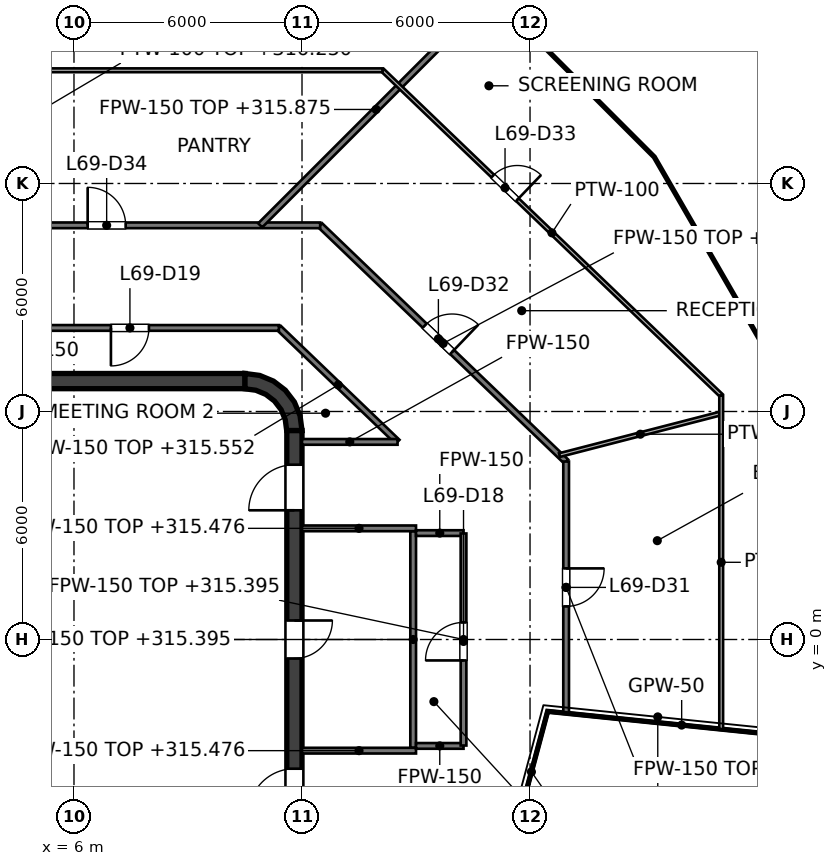
"""IFC4 building model, lengths in metres.
Left out: names, types, materials, properties, quantities, classifications, styles, units other than length and angle.
Written with IfcOpenShell. Run it as: python <this file> out.ifc"""

import sys

from ifc_helpers import new_model, si_unit, direction, frame, frame_2d, origin, place, context, subcontext, project, spatial, polyline, rectangle, outline, extrude, element, fill, save


model = new_model("IFC4")
c1 = context("Model", 3, precision=1e-05, world=origin(), true_north=direction((0.0, 1.0)))
c2 = subcontext(c1, "Body", "Model", "MODEL_VIEW")
j1 = project(units=[si_unit("LENGTHUNIT", "METRE"), si_unit("PLANEANGLEUNIT", "RADIAN")], contexts=[c1])
p1 = place(None, origin())
s1 = spatial("IfcSite", under=j1, at=p1, CompositionType="ELEMENT")
p2 = place(p1, origin())
s2 = spatial("IfcBuilding", under=s1, at=p2, CompositionType="ELEMENT")
p3 = place(p2, frame((0.0, 0.0, 312.4)))
s3 = spatial("IfcBuildingStorey", under=s2, at=p3, CompositionType="ELEMENT", Elevation=312.4)
p4 = place(p3, frame((-10.5, 6.8, 0.0), z_axis=(0.0, 0.0, 1.0), x_axis=(1.0, 0.0, 0.0)))
e1 = element("IfcWall", 1, at=p4, inside=s3, PredefinedType="SHEAR", context=c2, shape_type="SweptSolid", body=[
    extrude(rectangle(XDim=21.0, YDim=0.4, at=frame_2d((10.5, 0.0))), origin(), (0.0, 0.0, 1.0), 4.0),
])
p5 = place(p3, frame((11.8, -5.5, 0.0), z_axis=(0.0, 0.0, 1.0), x_axis=(0.0, 1.0, 0.0)))
e2 = element("IfcWall", 2, at=p5, inside=s3, PredefinedType="SHEAR", context=c2, shape_type="SweptSolid", body=[
    extrude(rectangle(XDim=11.0, YDim=0.4, at=frame_2d((5.5, 0.0))), origin(), (0.0, 0.0, 1.0), 4.0),
])
p6 = place(p5, frame((5.0, 0.0, 0.0)))
e3 = element("IfcOpeningElement", 3, at=p6, cuts=e2, PredefinedType="OPENING", context=c2, shape_type="SweptSolid", body=[
    extrude(rectangle(XDim=1.0, YDim=2.1, at=frame_2d((0.5, 1.05))), frame((0.0, 0.2, 0.0), z_axis=(0.0, -1.0, 0.0), x_axis=(1.0, 0.0, 0.0)), (0.0, 0.0, 1.0), 0.4),
])
p7 = place(p5, frame((0.9, 0.0, 0.0)))
e4 = element("IfcOpeningElement", 4, at=p7, cuts=e2, PredefinedType="OPENING", context=c2, shape_type="SweptSolid", body=[
    extrude(rectangle(XDim=1.2, YDim=2.1, at=frame_2d((0.6, 1.05))), frame((0.0, 0.2, 0.0), z_axis=(0.0, -1.0, 0.0), x_axis=(1.0, 0.0, 0.0)), (0.0, 0.0, 1.0), 0.4),
])
p8 = place(p5, frame((8.9, 0.0, 0.0)))
e5 = element("IfcOpeningElement", 5, at=p8, cuts=e2, PredefinedType="OPENING", context=c2, shape_type="SweptSolid", body=[
    extrude(rectangle(XDim=1.2, YDim=2.1, at=frame_2d((0.6, 1.05))), frame((0.0, 0.2, 0.0), z_axis=(0.0, -1.0, 0.0), x_axis=(1.0, 0.0, 0.0)), (0.0, 0.0, 1.0), 0.4),
])
p9 = place(p3, origin())
e6 = element("IfcWall", 6, at=p9, inside=s3, PredefinedType="SHEAR", context=c2, shape_type="SweptSolid", body=[
    extrude(outline(polyline([(10.5, 7.0), (10.5, 6.596), (10.784, 6.559), (11.048, 6.45), (11.275, 6.275), (11.45, 6.048), (11.559, 5.784), (11.596, 5.5), (12.0, 5.5), (11.949, 5.888), (11.799, 6.25), (11.561, 6.561), (11.25, 6.799), (10.888, 6.949), (10.5, 7.0)])), origin(), (0.0, 0.0, 1.0), 4.0),
])
p10 = place(p3, frame((9.0, 4.1, 0.0), z_axis=(0.0, 0.0, 1.0), x_axis=(0.0, 1.0, 0.0)))
e7 = element("IfcWall", 7, at=p10, inside=s3, PredefinedType="SOLIDWALL", context=c2, shape_type="SweptSolid", body=[
    extrude(rectangle(XDim=2.5, YDim=0.25, at=frame_2d((1.25, 0.0))), origin(), (0.0, 0.0, 1.0), 3.85),
])
p11 = place(p10, frame((0.65, 0.0, 0.0)))
e8 = element("IfcOpeningElement", 8, at=p11, cuts=e7, PredefinedType="OPENING", context=c2, shape_type="SweptSolid", body=[
    extrude(rectangle(XDim=1.2, YDim=2.1, at=frame_2d((0.6, 1.05))), frame((0.0, 0.125, 0.0), z_axis=(0.0, -1.0, 0.0), x_axis=(1.0, 0.0, 0.0)), (0.0, 0.0, 1.0), 0.25),
])
p12 = place(p3, frame((0.775, 1.525, 0.0), z_axis=(0.0, 0.0, 1.0), x_axis=(1.0, 0.0, 0.0)))
e9 = element("IfcWall", 9, at=p12, inside=s3, PredefinedType="SOLIDWALL", context=c2, shape_type="SweptSolid", body=[
    extrude(rectangle(XDim=8.35, YDim=0.25, at=frame_2d((4.175, 0.0))), origin(), (0.0, 0.0, 1.0), 3.85),
])
p13 = place(p12, frame((0.925, 0.0, 0.0)))
e10 = element("IfcOpeningElement", 10, at=p13, cuts=e9, PredefinedType="OPENING", context=c2, shape_type="SweptSolid", body=[
    extrude(rectangle(XDim=1.1, YDim=2.1, at=frame_2d((0.55, 1.05))), frame((0.0, 0.125, 0.0), z_axis=(0.0, -1.0, 0.0), x_axis=(1.0, 0.0, 0.0)), (0.0, 0.0, 1.0), 0.25),
])
p14 = place(p12, frame((3.625, 0.0, 0.0)))
e11 = element("IfcOpeningElement", 11, at=p14, cuts=e9, PredefinedType="OPENING", context=c2, shape_type="SweptSolid", body=[
    extrude(rectangle(XDim=1.1, YDim=2.1, at=frame_2d((0.55, 1.05))), frame((0.0, 0.125, 0.0), z_axis=(0.0, -1.0, 0.0), x_axis=(1.0, 0.0, 0.0)), (0.0, 0.0, 1.0), 0.25),
])
p15 = place(p12, frame((6.325, 0.0, 0.0)))
e12 = element("IfcOpeningElement", 12, at=p15, cuts=e9, PredefinedType="OPENING", context=c2, shape_type="SweptSolid", body=[
    extrude(rectangle(XDim=1.1, YDim=2.1, at=frame_2d((0.55, 1.05))), frame((0.0, 0.125, 0.0), z_axis=(0.0, -1.0, 0.0), x_axis=(1.0, 0.0, 0.0)), (0.0, 0.0, 1.0), 0.25),
])
p16 = place(p3, frame((0.775, 3.975, 0.0), z_axis=(0.0, 0.0, 1.0), x_axis=(1.0, 0.0, 0.0)))
e13 = element("IfcWall", 13, at=p16, inside=s3, PredefinedType="SOLIDWALL", context=c2, shape_type="SweptSolid", body=[
    extrude(rectangle(XDim=8.35, YDim=0.25, at=frame_2d((4.175, 0.0))), origin(), (0.0, 0.0, 1.0), 3.85),
])
for number, where, z_axis, x_axis in (
    (14, (9.0, 1.65, 0.0), (0.0, 0.0, 1.0), (0.0, 1.0, 0.0)),
    (15, (6.3, 1.65, 0.0), (0.0, 0.0, 1.0), (0.0, 1.0, 0.0)),
):
    element("IfcWall", number, at=place(p3, frame(where, z_axis=z_axis, x_axis=x_axis)), inside=s3, PredefinedType="SOLIDWALL", context=c2, shape_type="SweptSolid", body=[
        extrude(rectangle(XDim=2.2, YDim=0.25, at=frame_2d((1.1, 0.0))), origin(), (0.0, 0.0, 1.0), 3.85),
    ])
p17 = place(p3, frame((-9.125, -1.525, 0.0), z_axis=(0.0, 0.0, 1.0), x_axis=(1.0, 0.0, 0.0)))
e16 = element("IfcWall", 16, at=p17, inside=s3, PredefinedType="SOLIDWALL", context=c2, shape_type="SweptSolid", body=[
    extrude(rectangle(XDim=18.25, YDim=0.25, at=frame_2d((9.125, 0.0))), origin(), (0.0, 0.0, 1.0), 3.85),
])
p18 = place(p17, frame((7.15, 0.0, 0.0)))
e17 = element("IfcOpeningElement", 17, at=p18, cuts=e16, PredefinedType="OPENING", context=c2, shape_type="SweptSolid", body=[
    extrude(rectangle(XDim=1.2, YDim=2.1, at=frame_2d((0.6, 1.05))), frame((0.0, 0.125, 0.0), z_axis=(0.0, -1.0, 0.0), x_axis=(1.0, 0.0, 0.0)), (0.0, 0.0, 1.0), 0.25),
])
p19 = place(p17, frame((10.2, 0.0, 0.0)))
e18 = element("IfcOpeningElement", 18, at=p19, cuts=e16, PredefinedType="OPENING", context=c2, shape_type="SweptSolid", body=[
    extrude(rectangle(XDim=1.2, YDim=2.1, at=frame_2d((0.6, 1.05))), frame((0.0, 0.125, 0.0), z_axis=(0.0, -1.0, 0.0), x_axis=(1.0, 0.0, 0.0)), (0.0, 0.0, 1.0), 0.25),
])
p20 = place(p17, frame((16.075, 0.0, 0.0)))
e19 = element("IfcOpeningElement", 19, at=p20, cuts=e16, PredefinedType="OPENING", context=c2, shape_type="SweptSolid", body=[
    extrude(rectangle(XDim=1.0, YDim=2.1, at=frame_2d((0.5, 1.05))), frame((0.0, 0.125, 0.0), z_axis=(0.0, -1.0, 0.0), x_axis=(1.0, 0.0, 0.0)), (0.0, 0.0, 1.0), 0.25),
])
for number, where, z_axis, x_axis in (
    (20, (5.9, -3.85, 0.0), (0.0, 0.0, 1.0), (0.0, 1.0, 0.0)),
    (21, (9.0, -3.85, 0.0), (0.0, 0.0, 1.0), (0.0, 1.0, 0.0)),
):
    element("IfcWall", number, at=place(p3, frame(where, z_axis=z_axis, x_axis=x_axis)), inside=s3, PredefinedType="SOLIDWALL", context=c2, shape_type="SweptSolid", body=[
        extrude(rectangle(XDim=2.2, YDim=0.25, at=frame_2d((1.1, 0.0))), origin(), (0.0, 0.0, 1.0), 3.85),
    ])
p21 = place(p3, frame((14.925, -2.85, 0.0), z_axis=(0.0, 0.0, 1.0), x_axis=(0.0, 1.0, 0.0)))
e22 = element("IfcWall", 22, at=p21, inside=s3, PredefinedType="PARTITIONING", context=c2, shape_type="SweptSolid", body=[
    extrude(rectangle(XDim=5.7, YDim=0.15, at=frame_2d((2.85, 0.0))), origin(), (0.0, 0.0, 1.0), 2.995),
])
for number, where, z_axis, x_axis in (
    (23, (12.0, 2.925, 0.0), (0.0, 0.0, 1.0), (1.0, 0.0, 0.0)),
    (24, (12.0, -2.925, 0.0), (0.0, 0.0, 1.0), (1.0, 0.0, 0.0)),
):
    element("IfcWall", number, at=place(p3, frame(where, z_axis=z_axis, x_axis=x_axis)), inside=s3, PredefinedType="PARTITIONING", context=c2, shape_type="SweptSolid", body=[
        extrude(rectangle(XDim=3.0, YDim=0.15, at=frame_2d((1.5, 0.0))), origin(), (0.0, 0.0, 1.0), 3.076),
    ])
p22 = place(p3, frame((11.391, 8.199, 0.0), z_axis=(0.0, 0.0, 1.0), x_axis=(0.721311820102, -0.69261046641, 0.0)))
e25 = element("IfcWall", 25, at=p22, inside=s3, PredefinedType="PARTITIONING", context=c2, shape_type="SweptSolid", body=[
    extrude(rectangle(XDim=4.33, YDim=0.15, at=frame_2d((2.165, 0.0))), origin(), (0.0, 0.0, 1.0), 3.152),
])
p23 = place(p3, frame((12.478, 10.899, 0.0), z_axis=(0.0, 0.0, 1.0), x_axis=(0.721299239471, -0.692623568137, 0.0)))
e26 = element("IfcWall", 26, at=p23, inside=s3, PredefinedType="PARTITIONING", context=c2, shape_type="SweptSolid", body=[
    extrude(rectangle(XDim=8.974, YDim=0.15, at=frame_2d((4.487, 0.0))), origin(), (0.0, 0.0, 1.0), 3.076),
])
p24 = place(p23, frame((3.813, 0.0, 0.0)))
e27 = element("IfcOpeningElement", 27, at=p24, cuts=e26, PredefinedType="OPENING", context=c2, shape_type="SweptSolid", body=[
    extrude(rectangle(XDim=1.0, YDim=2.1, at=frame_2d((0.5, 1.05))), frame((0.0, 0.075, 0.0), z_axis=(0.0, -1.0, 0.0), x_axis=(1.0, 0.0, 0.0)), (0.0, 0.0, 1.0), 0.15),
])
for number, where, z_axis, x_axis in (
    (28, (15.0, -2.8, 0.0), (0.0, 0.0, 1.0), (1.0, 0.0, 0.0)),
    (29, (15.0, 2.8, 0.0), (0.0, 0.0, 1.0), (1.0, 0.0, 0.0)),
):
    element("IfcWall", number, at=place(p3, frame(where, z_axis=z_axis, x_axis=x_axis)), inside=s3, PredefinedType="PARTITIONING", context=c2, shape_type="SweptSolid", body=[
        extrude(rectangle(XDim=1.25, YDim=0.15, at=frame_2d((0.625, 0.0))), origin(), (0.0, 0.0, 1.0), 3.85),
    ])
p25 = place(p3, frame((12.0, 5.2, 0.0), z_axis=(0.0, 0.0, 1.0), x_axis=(1.0, 0.0, 0.0)))
e30 = element("IfcWall", 30, at=p25, inside=s3, PredefinedType="PARTITIONING", context=c2, shape_type="SweptSolid", body=[
    extrude(rectangle(XDim=2.514, YDim=0.15, at=frame_2d((1.257, 0.0))), origin(), (0.0, 0.0, 1.0), 3.85),
])
p26 = place(p3, frame((-11.391, 8.199, 0.0), z_axis=(0.0, 0.0, 1.0), x_axis=(1.0, 0.0, 0.0)))
e31 = element("IfcWall", 31, at=p26, inside=s3, PredefinedType="PARTITIONING", context=c2, shape_type="SweptSolid", body=[
    extrude(rectangle(XDim=22.782, YDim=0.15, at=frame_2d((11.391, 0.0))), origin(), (0.0, 0.0, 1.0), 2.927),
])
p27 = place(p26, frame((18.363, 0.0, 0.0)))
e32 = element("IfcOpeningElement", 32, at=p27, cuts=e31, PredefinedType="OPENING", context=c2, shape_type="SweptSolid", body=[
    extrude(rectangle(XDim=1.0, YDim=2.1, at=frame_2d((0.5, 1.05))), frame((0.0, 0.075, 0.0), z_axis=(0.0, -1.0, 0.0), x_axis=(1.0, 0.0, 0.0)), (0.0, 0.0, 1.0), 0.15),
])
p28 = place(p26, frame((10.841, 0.0, 0.0)))
e33 = element("IfcOpeningElement", 33, at=p28, cuts=e31, PredefinedType="OPENING", context=c2, shape_type="SweptSolid", body=[
    extrude(rectangle(XDim=1.0, YDim=2.1, at=frame_2d((0.5, 1.05))), frame((0.0, 0.075, 0.0), z_axis=(0.0, -1.0, 0.0), x_axis=(1.0, 0.0, 0.0)), (0.0, 0.0, 1.0), 0.15),
])
p29 = place(p26, frame((3.419, 0.0, 0.0)))
e34 = element("IfcOpeningElement", 34, at=p29, cuts=e31, PredefinedType="OPENING", context=c2, shape_type="SweptSolid", body=[
    extrude(rectangle(XDim=1.0, YDim=2.1, at=frame_2d((0.5, 1.05))), frame((0.0, 0.075, 0.0), z_axis=(0.0, -1.0, 0.0), x_axis=(1.0, 0.0, 0.0)), (0.0, 0.0, 1.0), 0.15),
])
p30 = place(p3, frame((-12.478, 10.899, 0.0), z_axis=(0.0, 0.0, 1.0), x_axis=(1.0, 0.0, 0.0)))
e35 = element("IfcWall", 35, at=p30, inside=s3, PredefinedType="PARTITIONING", context=c2, shape_type="SweptSolid", body=[
    extrude(rectangle(XDim=24.956, YDim=0.15, at=frame_2d((12.478, 0.0))), origin(), (0.0, 0.0, 1.0), 2.927),
])
p31 = place(p30, frame((18.838, 0.0, 0.0)))
e36 = element("IfcOpeningElement", 36, at=p31, cuts=e35, PredefinedType="OPENING", context=c2, shape_type="SweptSolid", body=[
    extrude(rectangle(XDim=1.0, YDim=2.1, at=frame_2d((0.5, 1.05))), frame((0.0, 0.075, 0.0), z_axis=(0.0, -1.0, 0.0), x_axis=(1.0, 0.0, 0.0)), (0.0, 0.0, 1.0), 0.15),
])
p32 = place(p30, frame((10.292, 0.0, 0.0)))
e37 = element("IfcOpeningElement", 37, at=p32, cuts=e35, PredefinedType="OPENING", context=c2, shape_type="SweptSolid", body=[
    extrude(rectangle(XDim=1.0, YDim=2.1, at=frame_2d((0.5, 1.05))), frame((0.0, 0.075, 0.0), z_axis=(0.0, -1.0, 0.0), x_axis=(1.0, 0.0, 0.0)), (0.0, 0.0, 1.0), 0.15),
])
p33 = place(p3, frame((10.9, 10.899, 0.0), z_axis=(0.0, 0.0, 1.0), x_axis=(0.707106781187, 0.707106781187, 0.0)))
e38 = element("IfcWall", 38, at=p33, inside=s3, PredefinedType="PARTITIONING", context=c2, shape_type="SweptSolid", body=[
    extrude(rectangle(XDim=8.624, YDim=0.15, at=frame_2d((4.312, 0.0))), origin(), (0.0, 0.0, 1.0), 3.475),
])
p34 = place(p3, frame((18.95, -1.941, 0.0), z_axis=(0.0, 0.0, 1.0), x_axis=(0.0, 1.0, 0.0)))
e39 = element("IfcWall", 39, at=p34, inside=s3, PredefinedType="PARTITIONING", context=c2, shape_type="SweptSolid", body=[
    extrude(rectangle(XDim=6.624, YDim=0.15, at=frame_2d((3.312, 0.0))), origin(), (0.0, 0.0, 1.0), 2.995),
])
p35 = place(p34, frame((2.812, 0.0, 0.0)))
e40 = element("IfcOpeningElement", 40, at=p35, cuts=e39, PredefinedType="OPENING", context=c2, shape_type="SweptSolid", body=[
    extrude(rectangle(XDim=1.0, YDim=2.1, at=frame_2d((0.5, 1.05))), frame((0.0, 0.075, 0.0), z_axis=(0.0, -1.0, 0.0), x_axis=(1.0, 0.0, 0.0)), (0.0, 0.0, 1.0), 0.15),
])
p36 = place(p3, frame((16.25, -2.79, 0.0), z_axis=(0.0, 0.0, 1.0), x_axis=(0.0, 1.0, 0.0)))
e41 = element("IfcWall", 41, at=p36, inside=s3, PredefinedType="PARTITIONING", context=c2, shape_type="SweptSolid", body=[
    extrude(rectangle(XDim=5.58, YDim=0.15, at=frame_2d((2.79, 0.0))), origin(), (0.0, 0.0, 1.0), 2.995),
])
p37 = place(p36, frame((2.239, 0.0, 0.0)))
e42 = element("IfcOpeningElement", 42, at=p37, cuts=e41, PredefinedType="OPENING", context=c2, shape_type="SweptSolid", body=[
    extrude(rectangle(XDim=1.0, YDim=2.1, at=frame_2d((0.5, 1.05))), frame((0.0, 0.075, 0.0), z_axis=(0.0, -1.0, 0.0), x_axis=(1.0, 0.0, 0.0)), (0.0, 0.0, 1.0), 0.15),
])
p38 = place(p3, frame((18.463, -1.891, 0.0), z_axis=(0.0, 0.0, 1.0), x_axis=(0.994796749693, -0.101879471925, 0.0)))
e43 = element("IfcWall", 43, at=p38, inside=s3, PredefinedType="PARTITIONING", context=c2, shape_type="SweptSolid", body=[
    extrude(rectangle(XDim=7.091, YDim=0.05, at=frame_2d((3.545, 0.0))), origin(), (0.0, 0.0, 1.0), 3.076),
])
p39 = place(p3, frame((17.61, -5.075, 0.0), z_axis=(0.0, 0.0, 1.0), x_axis=(0.258727446254, 0.965950365472, 0.0)))
e44 = element("IfcWall", 44, at=p39, inside=s3, PredefinedType="PARTITIONING", context=c2, shape_type="SweptSolid", body=[
    extrude(rectangle(XDim=3.296, YDim=0.05, at=frame_2d((1.648, 0.0))), origin(), (0.0, 0.0, 1.0), 3.076),
])
p40 = place(p3, frame((14.12, 14.979, 0.0), z_axis=(0.0, 0.0, 1.0), x_axis=(0.721327687229, -0.69259394138, 0.0)))
e45 = element("IfcWall", 45, at=p40, inside=s3, PredefinedType="PARTITIONING", context=c2, shape_type="SweptSolid", body=[
    extrude(rectangle(XDim=12.354, YDim=0.1, at=frame_2d((6.177, 0.0))), origin(), (0.0, 0.0, 1.0), 2.995),
])
p41 = place(p40, frame((4.017, 0.0, 0.0)))
e46 = element("IfcOpeningElement", 46, at=p41, cuts=e45, PredefinedType="OPENING", context=c2, shape_type="SweptSolid", body=[
    extrude(rectangle(XDim=0.9, YDim=2.1, at=frame_2d((0.45, 1.05))), frame((0.0, 0.05, 0.0), z_axis=(0.0, -1.0, 0.0), x_axis=(1.0, 0.0, 0.0)), (0.0, 0.0, 1.0), 0.1),
])
p42 = place(p3, frame((-14.12, 14.979, 0.0), z_axis=(0.0, 0.0, 1.0), x_axis=(1.0, 0.0, 0.0)))
e47 = element("IfcWall", 47, at=p42, inside=s3, PredefinedType="PARTITIONING", context=c2, shape_type="SweptSolid", body=[
    extrude(rectangle(XDim=28.24, YDim=0.1, at=frame_2d((14.12, 0.0))), origin(), (0.0, 0.0, 1.0), 2.927),
])
p43 = place(p42, frame((10.903, 0.0, 0.0)))
e48 = element("IfcOpeningElement", 48, at=p43, cuts=e47, PredefinedType="OPENING", context=c2, shape_type="SweptSolid", body=[
    extrude(rectangle(XDim=1.8, YDim=2.1, at=frame_2d((0.9, 1.05))), frame((0.0, 0.05, 0.0), z_axis=(0.0, -1.0, 0.0), x_axis=(1.0, 0.0, 0.0)), (0.0, 0.0, 1.0), 0.1),
])
p44 = place(p3, frame((18.774, 4.852, 0.0), z_axis=(0.0, 0.0, 1.0), x_axis=(0.968194478258, 0.250198825478, 0.0)))
e49 = element("IfcWall", 49, at=p44, inside=s3, PredefinedType="PARTITIONING", context=c2, shape_type="SweptSolid", body=[
    extrude(rectangle(XDim=4.396, YDim=0.1, at=frame_2d((2.198, 0.0))), origin(), (0.0, 0.0, 1.0), 3.85),
])
p45 = place(p3, frame((23.03, -2.358, 0.0), z_axis=(0.0, 0.0, 1.0), x_axis=(0.0, 1.0, 0.0)))
e50 = element("IfcWall", 50, at=p45, inside=s3, PredefinedType="PARTITIONING", context=c2, shape_type="SweptSolid", body=[
    extrude(rectangle(XDim=8.779, YDim=0.1, at=frame_2d((4.389, 0.0))), origin(), (0.0, 0.0, 1.0), 2.995),
])
p46 = place(p14, origin())
e51 = element("IfcDoor", 51, at=p46, inside=s3, OperationType="DOUBLE_DOOR_SLIDING", PredefinedType="DOOR", context=c2, shape_type="SweptSolid", body=[
    extrude(rectangle(XDim=1.1, YDim=2.1, at=frame_2d((0.55, 1.05))), frame((0.0, 0.025, 0.0), z_axis=(0.0, -1.0, 0.0), x_axis=(1.0, 0.0, 0.0)), (0.0, 0.0, 1.0), 0.05),
])
fill(e11, e51)
p47 = place(p15, origin())
e52 = element("IfcDoor", 52, at=p47, inside=s3, OperationType="DOUBLE_DOOR_SLIDING", PredefinedType="DOOR", context=c2, shape_type="SweptSolid", body=[
    extrude(rectangle(XDim=1.1, YDim=2.1, at=frame_2d((0.55, 1.05))), frame((0.0, 0.025, 0.0), z_axis=(0.0, -1.0, 0.0), x_axis=(1.0, 0.0, 0.0)), (0.0, 0.0, 1.0), 0.05),
])
fill(e12, e52)
p48 = place(p11, origin())
e53 = element("IfcDoor", 53, at=p48, inside=s3, OperationType="SINGLE_SWING_LEFT", PredefinedType="DOOR", context=c2, shape_type="SweptSolid", body=[
    extrude(rectangle(XDim=1.2, YDim=2.1, at=frame_2d((0.6, 1.05))), frame((0.0, 0.025, 0.0), z_axis=(0.0, -1.0, 0.0), x_axis=(1.0, 0.0, 0.0)), (0.0, 0.0, 1.0), 0.05),
])
fill(e8, e53)
p49 = place(p20, origin())
e54 = element("IfcDoor", 54, at=p49, inside=s3, OperationType="SINGLE_SWING_RIGHT", PredefinedType="DOOR", context=c2, shape_type="SweptSolid", body=[
    extrude(rectangle(XDim=1.0, YDim=2.1, at=frame_2d((0.5, 1.05))), frame((0.0, 0.025, 0.0), z_axis=(0.0, -1.0, 0.0), x_axis=(1.0, 0.0, 0.0)), (0.0, 0.0, 1.0), 0.05),
])
fill(e19, e54)
p50 = place(p6, origin())
e55 = element("IfcDoor", 55, at=p50, inside=s3, OperationType="SINGLE_SWING_RIGHT", PredefinedType="DOOR", context=c2, shape_type="SweptSolid", body=[
    extrude(rectangle(XDim=1.0, YDim=2.1, at=frame_2d((0.5, 1.05))), frame((0.0, 0.025, 0.0), z_axis=(0.0, -1.0, 0.0), x_axis=(1.0, 0.0, 0.0)), (0.0, 0.0, 1.0), 0.05),
])
fill(e3, e55)
p51 = place(p7, origin())
e56 = element("IfcDoor", 56, at=p51, inside=s3, OperationType="SINGLE_SWING_LEFT", PredefinedType="DOOR", context=c2, shape_type="SweptSolid", body=[
    extrude(rectangle(XDim=1.2, YDim=2.1, at=frame_2d((0.6, 1.05))), frame((0.0, 0.025, 0.0), z_axis=(0.0, -1.0, 0.0), x_axis=(1.0, 0.0, 0.0)), (0.0, 0.0, 1.0), 0.05),
])
fill(e4, e56)
p52 = place(p8, origin())
e57 = element("IfcDoor", 57, at=p52, inside=s3, OperationType="SINGLE_SWING_LEFT", PredefinedType="DOOR", context=c2, shape_type="SweptSolid", body=[
    extrude(rectangle(XDim=1.2, YDim=2.1, at=frame_2d((0.6, 1.05))), frame((0.0, 0.025, 0.0), z_axis=(0.0, -1.0, 0.0), x_axis=(1.0, 0.0, 0.0)), (0.0, 0.0, 1.0), 0.05),
])
fill(e5, e57)
p53 = place(p37, origin())
e58 = element("IfcDoor", 58, at=p53, inside=s3, OperationType="SINGLE_SWING_LEFT", PredefinedType="DOOR", context=c2, shape_type="SweptSolid", body=[
    extrude(rectangle(XDim=1.0, YDim=2.1, at=frame_2d((0.5, 1.05))), frame((0.0, 0.025, 0.0), z_axis=(0.0, -1.0, 0.0), x_axis=(1.0, 0.0, 0.0)), (0.0, 0.0, 1.0), 0.05),
])
fill(e42, e58)
p54 = place(p27, origin())
e59 = element("IfcDoor", 59, at=p54, inside=s3, OperationType="SINGLE_SWING_LEFT", PredefinedType="DOOR", context=c2, shape_type="SweptSolid", body=[
    extrude(rectangle(XDim=1.0, YDim=2.1, at=frame_2d((0.5, 1.05))), frame((0.0, 0.025, 0.0), z_axis=(0.0, -1.0, 0.0), x_axis=(1.0, 0.0, 0.0)), (0.0, 0.0, 1.0), 0.05),
])
fill(e32, e59)
p55 = place(p35, origin())
e60 = element("IfcDoor", 60, at=p55, inside=s3, OperationType="SINGLE_SWING_RIGHT", PredefinedType="DOOR", context=c2, shape_type="SweptSolid", body=[
    extrude(rectangle(XDim=1.0, YDim=2.1, at=frame_2d((0.5, 1.05))), frame((0.0, 0.025, 0.0), z_axis=(0.0, -1.0, 0.0), x_axis=(1.0, 0.0, 0.0)), (0.0, 0.0, 1.0), 0.05),
])
fill(e40, e60)
p56 = place(p24, origin())
e61 = element("IfcDoor", 61, at=p56, inside=s3, OperationType="SINGLE_SWING_RIGHT", PredefinedType="DOOR", context=c2, shape_type="SweptSolid", body=[
    extrude(rectangle(XDim=1.0, YDim=2.1, at=frame_2d((0.5, 1.05))), frame((0.0, 0.025, 0.0), z_axis=(0.0, -1.0, 0.0), x_axis=(1.0, 0.0, 0.0)), (0.0, 0.0, 1.0), 0.05),
])
fill(e27, e61)
p57 = place(p41, origin())
e62 = element("IfcDoor", 62, at=p57, inside=s3, OperationType="SINGLE_SWING_RIGHT", PredefinedType="DOOR", context=c2, shape_type="SweptSolid", body=[
    extrude(rectangle(XDim=0.9, YDim=2.1, at=frame_2d((0.45, 1.05))), frame((0.0, 0.025, 0.0), z_axis=(0.0, -1.0, 0.0), x_axis=(1.0, 0.0, 0.0)), (0.0, 0.0, 1.0), 0.05),
])
fill(e46, e62)
p58 = place(p31, origin())
e63 = element("IfcDoor", 63, at=p58, inside=s3, OperationType="SINGLE_SWING_LEFT", PredefinedType="DOOR", context=c2, shape_type="SweptSolid", body=[
    extrude(rectangle(XDim=1.0, YDim=2.1, at=frame_2d((0.5, 1.05))), frame((0.0, 0.025, 0.0), z_axis=(0.0, -1.0, 0.0), x_axis=(1.0, 0.0, 0.0)), (0.0, 0.0, 1.0), 0.05),
])
fill(e36, e63)
save(model, sys.argv[1])
